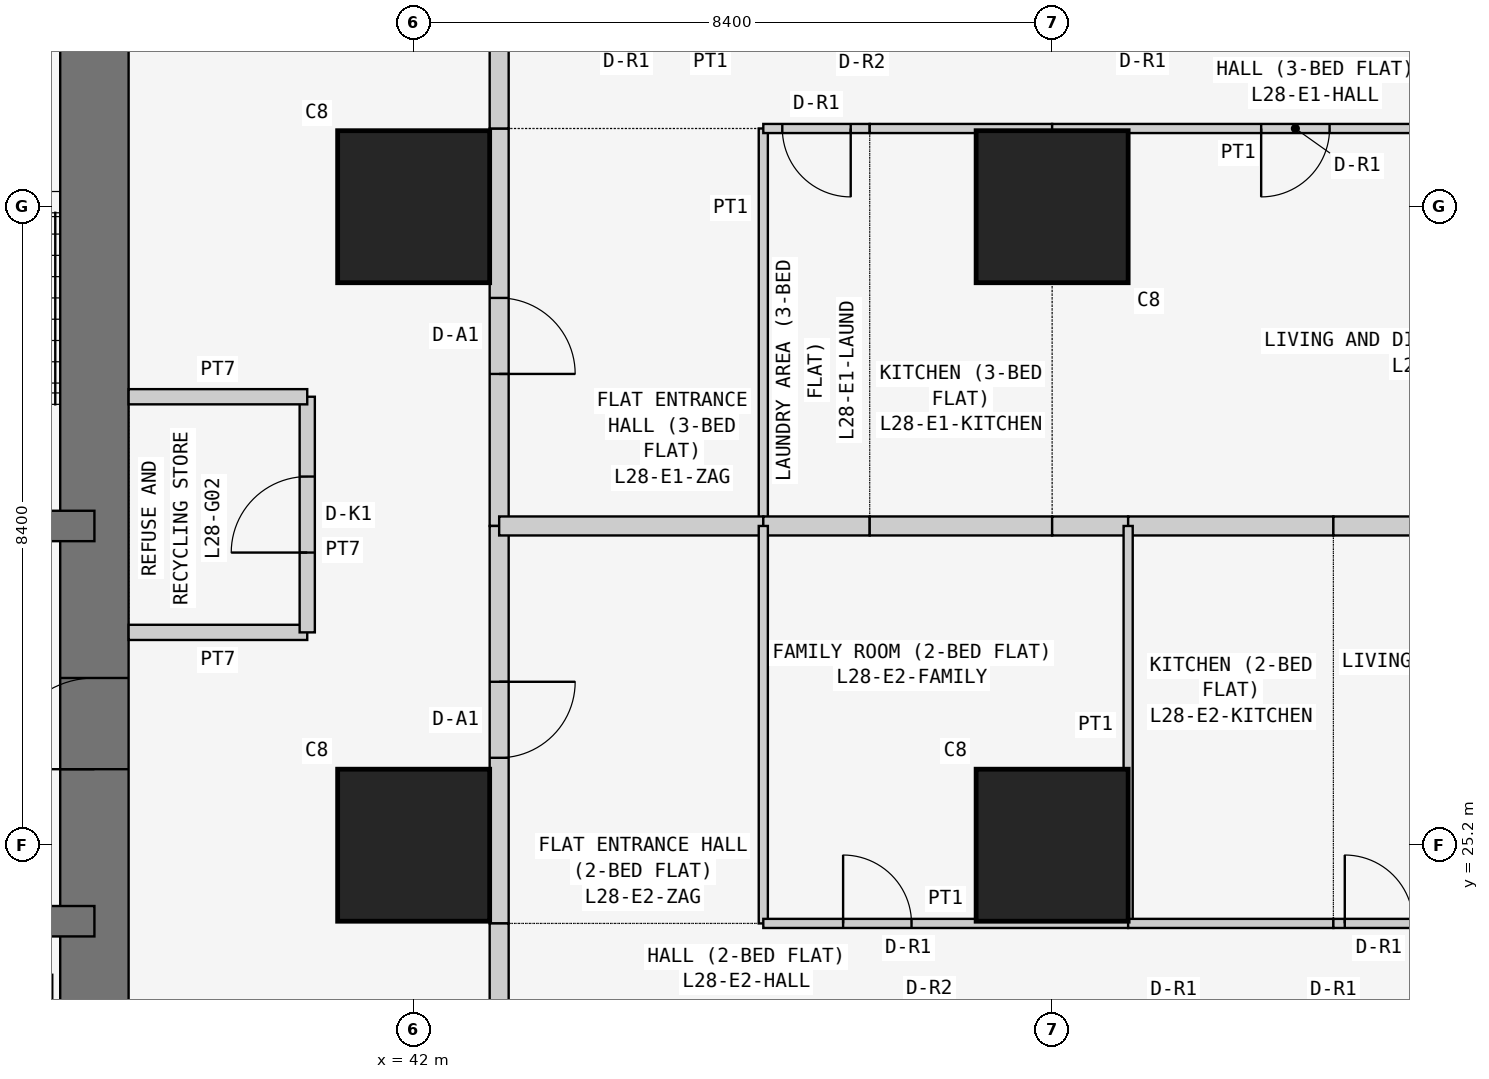
"""IFC4 building model, lengths in metres.
Left out: names, types, materials, properties, quantities, classifications, styles, units other than length and angle.
Written with IfcOpenShell. Run it as: python <this file> out.ifc"""

import sys

from ifc_helpers import new_model, si_unit, direction, frame, frame_2d, origin, origin_2d, place, context, subcontext, project, spatial, rectangle, extrude, element, fill, save


model = new_model("IFC4")
c1 = context("Model", 3, precision=1e-05, world=origin(), true_north=direction((0.0, 1.0)))
c2 = subcontext(c1, "Body", "Model", "MODEL_VIEW")
j1 = project(units=[si_unit("LENGTHUNIT", "METRE"), si_unit("PLANEANGLEUNIT", "RADIAN")], contexts=[c1])
p1 = place(None, origin())
s1 = spatial("IfcSite", under=j1, at=p1, CompositionType="ELEMENT")
p2 = place(p1, origin())
s2 = spatial("IfcBuilding", under=s1, at=p2, CompositionType="ELEMENT")
p3 = place(p2, frame((0.0, 0.0, 112.5)))
s3 = spatial("IfcBuildingStorey", under=s2, at=p3, CompositionType="ELEMENT", Elevation=112.5)
for number, where, z_axis, x_axis in (
    (1, (42.0, 25.2, 0.0), (0.0, 0.0, 1.0), (1.0, 0.0, 0.0)),
    (2, (42.0, 33.6, 0.0), (0.0, 0.0, 1.0), (1.0, 0.0, 0.0)),
    (3, (50.4, 25.2, 0.0), (0.0, 0.0, 1.0), (1.0, 0.0, 0.0)),
    (4, (50.4, 33.6, 0.0), (0.0, 0.0, 1.0), (1.0, 0.0, 0.0)),
):
    element("IfcColumn", number, at=place(p3, frame(where, z_axis=z_axis, x_axis=x_axis)), inside=s3, PredefinedType="COLUMN", context=c2, shape_type="SweptSolid", body=[
        extrude(rectangle(XDim=2.0, YDim=2.0, at=origin_2d()), origin(), (0.0, 0.0, 1.0), 3.6),
    ])
p4 = place(p3, frame((37.8, 21.0, 0.0), z_axis=(0.0, 0.0, 1.0), x_axis=(0.0, 1.0, 0.0)))
e5 = element("IfcWall", 5, at=p4, inside=s3, PredefinedType="SHEAR", context=c2, shape_type="SweptSolid", body=[
    extrude(rectangle(XDim=17.25, YDim=0.9, at=frame_2d((8.625, 0.0))), origin(), (0.0, 0.0, 1.0), 3.6),
])
p5 = place(p4, frame((5.2, 0.0, 0.0)))
e6 = element("IfcOpeningElement", 6, at=p5, cuts=e5, PredefinedType="OPENING", context=c2, shape_type="SweptSolid", body=[
    extrude(rectangle(XDim=1.2, YDim=2.1, at=frame_2d((0.6, 1.05))), frame((0.0, 0.46, 0.0), z_axis=(0.0, -1.0, 0.0), x_axis=(1.0, 0.0, 0.0)), (0.0, 0.0, 1.0), 0.92),
])
p6 = place(p3, frame((26.6, 24.2, 0.0), z_axis=(0.0, 0.0, 1.0), x_axis=(1.0, 0.0, 0.0)))
e7 = element("IfcWall", 7, at=p6, inside=s3, PredefinedType="SHEAR", context=c2, shape_type="SweptSolid", body=[
    extrude(rectangle(XDim=11.2, YDim=0.4, at=frame_2d((5.6, 0.0))), origin(), (0.0, 0.0, 1.0), 3.6),
])
p7 = place(p6, frame((0.85, 0.0, 0.0)))
e8 = element("IfcOpeningElement", 8, at=p7, cuts=e7, PredefinedType="OPENING", context=c2, shape_type="SweptSolid", body=[
    extrude(rectangle(XDim=1.1, YDim=2.1, at=frame_2d((0.55, 1.05))), frame((0.0, 0.21, 0.0), z_axis=(0.0, -1.0, 0.0), x_axis=(1.0, 0.0, 0.0)), (0.0, 0.0, 1.0), 0.42),
])
p8 = place(p6, frame((3.65, 0.0, 0.0)))
e9 = element("IfcOpeningElement", 9, at=p8, cuts=e7, PredefinedType="OPENING", context=c2, shape_type="SweptSolid", body=[
    extrude(rectangle(XDim=1.1, YDim=2.1, at=frame_2d((0.55, 1.05))), frame((0.0, 0.21, 0.0), z_axis=(0.0, -1.0, 0.0), x_axis=(1.0, 0.0, 0.0)), (0.0, 0.0, 1.0), 0.42),
])
p9 = place(p3, frame((32.2, 29.4, 0.0), z_axis=(0.0, 0.0, 1.0), x_axis=(1.0, 0.0, 0.0)))
e10 = element("IfcWall", 10, at=p9, inside=s3, PredefinedType="SHEAR", context=c2, shape_type="SweptSolid", body=[
    extrude(rectangle(XDim=5.6, YDim=0.4, at=frame_2d((2.8, 0.0))), origin(), (0.0, 0.0, 1.0), 3.6),
])
p10 = place(p9, frame((2.0, 0.0, 0.0)))
e11 = element("IfcOpeningElement", 11, at=p10, cuts=e10, PredefinedType="OPENING", context=c2, shape_type="SweptSolid", body=[
    extrude(rectangle(XDim=1.2, YDim=2.1, at=frame_2d((0.6, 1.05))), frame((0.0, 0.21, 0.0), z_axis=(0.0, -1.0, 0.0), x_axis=(1.0, 0.0, 0.0)), (0.0, 0.0, 1.0), 0.42),
])
p11 = place(p3, frame((38.25, 28.0, 0.0), z_axis=(0.0, 0.0, 1.0), x_axis=(1.0, 0.0, 0.0)))
e12 = element("IfcWall", 12, at=p11, inside=s3, PredefinedType="PARTITIONING", context=c2, shape_type="SweptSolid", body=[
    extrude(rectangle(XDim=2.35, YDim=0.2, at=frame_2d((1.175, 0.0))), origin(), (0.0, 0.0, 1.0), 3.45),
])
p12 = place(p3, frame((40.6, 28.0, 0.0), z_axis=(0.0, 0.0, 1.0), x_axis=(0.0, 1.0, 0.0)))
e13 = element("IfcWall", 13, at=p12, inside=s3, PredefinedType="PARTITIONING", context=c2, shape_type="SweptSolid", body=[
    extrude(rectangle(XDim=3.1, YDim=0.2, at=frame_2d((1.55, 0.0))), origin(), (0.0, 0.0, 1.0), 3.45),
])
p13 = place(p12, frame((1.05, 0.0, 0.0)))
e14 = element("IfcOpeningElement", 14, at=p13, cuts=e13, PredefinedType="OPENING", context=c2, shape_type="SweptSolid", body=[
    extrude(rectangle(XDim=1.0, YDim=2.1, at=frame_2d((0.5, 1.05))), frame((0.0, 0.11, 0.0), z_axis=(0.0, -1.0, 0.0), x_axis=(1.0, 0.0, 0.0)), (0.0, 0.0, 1.0), 0.22),
])
p14 = place(p3, frame((40.6, 31.1, 0.0), z_axis=(0.0, 0.0, 1.0), x_axis=(-1.0, 0.0, 0.0)))
e15 = element("IfcWall", 15, at=p14, inside=s3, PredefinedType="PARTITIONING", context=c2, shape_type="SweptSolid", body=[
    extrude(rectangle(XDim=2.35, YDim=0.2, at=frame_2d((1.175, 0.0))), origin(), (0.0, 0.0, 1.0), 3.45),
])
p15 = place(p3, frame((43.125, 34.629, 0.0), z_axis=(0.0, 0.0, 1.0), x_axis=(0.0, -1.0, 0.0)))
e16 = element("IfcWall", 16, at=p15, inside=s3, PredefinedType="PARTITIONING", context=c2, shape_type="SweptSolid", body=[
    extrude(rectangle(XDim=5.229, YDim=0.25, at=frame_2d((2.615, 0.0))), origin(), (0.0, 0.0, 1.0), 3.45),
])
p16 = place(p15, frame((2.229, 0.0, 0.0)))
e17 = element("IfcOpeningElement", 17, at=p16, cuts=e16, PredefinedType="OPENING", context=c2, shape_type="SweptSolid", body=[
    extrude(rectangle(XDim=1.0, YDim=2.1, at=frame_2d((0.5, 1.05))), frame((0.0, 0.135, 0.0), z_axis=(0.0, -1.0, 0.0), x_axis=(1.0, 0.0, 0.0)), (0.0, 0.0, 1.0), 0.27),
])
p17 = place(p3, frame((43.125, 35.829, 0.0), z_axis=(0.0, 0.0, 1.0), x_axis=(0.0, -1.0, 0.0)))
e18 = element("IfcWall", 18, at=p17, inside=s3, PredefinedType="PARTITIONING", context=c2, shape_type="SweptSolid", body=[
    extrude(rectangle(XDim=1.2, YDim=0.25, at=frame_2d((0.6, 0.0))), origin(), (0.0, 0.0, 1.0), 3.45),
])
p18 = place(p3, frame((43.125, 29.4, 0.0), z_axis=(0.0, 0.0, 1.0), x_axis=(0.0, -1.0, 0.0)))
e19 = element("IfcWall", 19, at=p18, inside=s3, PredefinedType="PARTITIONING", context=c2, shape_type="SweptSolid", body=[
    extrude(rectangle(XDim=5.229, YDim=0.25, at=frame_2d((2.615, 0.0))), origin(), (0.0, 0.0, 1.0), 3.45),
])
p19 = place(p18, frame((2.05, 0.0, 0.0)))
e20 = element("IfcOpeningElement", 20, at=p19, cuts=e19, PredefinedType="OPENING", context=c2, shape_type="SweptSolid", body=[
    extrude(rectangle(XDim=1.0, YDim=2.1, at=frame_2d((0.5, 1.05))), frame((0.0, 0.135, 0.0), z_axis=(0.0, -1.0, 0.0), x_axis=(1.0, 0.0, 0.0)), (0.0, 0.0, 1.0), 0.27),
])
p20 = place(p3, frame((43.125, 24.171, 0.0), z_axis=(0.0, 0.0, 1.0), x_axis=(0.0, -1.0, 0.0)))
e21 = element("IfcWall", 21, at=p20, inside=s3, PredefinedType="PARTITIONING", context=c2, shape_type="SweptSolid", body=[
    extrude(rectangle(XDim=1.2, YDim=0.25, at=frame_2d((0.6, 0.0))), origin(), (0.0, 0.0, 1.0), 3.45),
])
p21 = place(p3, frame((46.6, 29.4, 0.0), z_axis=(0.0, 0.0, 1.0), x_axis=(0.0, 1.0, 0.0)))
e22 = element("IfcWall", 22, at=p21, inside=s3, PredefinedType="PARTITIONING", context=c2, shape_type="SweptSolid", body=[
    extrude(rectangle(XDim=5.229, YDim=0.12, at=frame_2d((2.615, 0.0))), origin(), (0.0, 0.0, 1.0), 3.45),
])
p22 = place(p3, frame((43.125, 29.4, 0.0), z_axis=(0.0, 0.0, 1.0), x_axis=(1.0, 0.0, 0.0)))
e23 = element("IfcWall", 23, at=p22, inside=s3, PredefinedType="PARTITIONING", context=c2, shape_type="SweptSolid", body=[
    extrude(rectangle(XDim=3.475, YDim=0.25, at=frame_2d((1.738, 0.0))), origin(), (0.0, 0.0, 1.0), 3.45),
])
p23 = place(p3, frame((48.0, 34.629, 0.0), z_axis=(0.0, 0.0, 1.0), x_axis=(-1.0, 0.0, 0.0)))
e24 = element("IfcWall", 24, at=p23, inside=s3, PredefinedType="PARTITIONING", context=c2, shape_type="SweptSolid", body=[
    extrude(rectangle(XDim=1.4, YDim=0.12, at=frame_2d((0.7, 0.0))), origin(), (0.0, 0.0, 1.0), 3.45),
])
p24 = place(p23, frame((0.25, 0.0, 0.0)))
e25 = element("IfcOpeningElement", 25, at=p24, cuts=e24, PredefinedType="OPENING", context=c2, shape_type="SweptSolid", body=[
    extrude(rectangle(XDim=0.9, YDim=2.1, at=frame_2d((0.45, 1.05))), frame((0.0, 0.07, 0.0), z_axis=(0.0, -1.0, 0.0), x_axis=(1.0, 0.0, 0.0)), (0.0, 0.0, 1.0), 0.14),
])
p25 = place(p3, frame((46.6, 29.4, 0.0), z_axis=(0.0, 0.0, 1.0), x_axis=(1.0, 0.0, 0.0)))
e26 = element("IfcWall", 26, at=p25, inside=s3, PredefinedType="PARTITIONING", context=c2, shape_type="SweptSolid", body=[
    extrude(rectangle(XDim=1.4, YDim=0.25, at=frame_2d((0.7, 0.0))), origin(), (0.0, 0.0, 1.0), 3.45),
])
p26 = place(p3, frame((50.4, 34.629, 0.0), z_axis=(0.0, 0.0, 1.0), x_axis=(-1.0, 0.0, 0.0)))
e27 = element("IfcWall", 27, at=p26, inside=s3, PredefinedType="PARTITIONING", context=c2, shape_type="SweptSolid", body=[
    extrude(rectangle(XDim=2.4, YDim=0.12, at=frame_2d((1.2, 0.0))), origin(), (0.0, 0.0, 1.0), 3.45),
])
p27 = place(p3, frame((48.0, 29.4, 0.0), z_axis=(0.0, 0.0, 1.0), x_axis=(1.0, 0.0, 0.0)))
e28 = element("IfcWall", 28, at=p27, inside=s3, PredefinedType="PARTITIONING", context=c2, shape_type="SweptSolid", body=[
    extrude(rectangle(XDim=2.4, YDim=0.25, at=frame_2d((1.2, 0.0))), origin(), (0.0, 0.0, 1.0), 3.45),
])
p28 = place(p3, frame((55.3, 34.629, 0.0), z_axis=(0.0, 0.0, 1.0), x_axis=(-1.0, 0.0, 0.0)))
e29 = element("IfcWall", 29, at=p28, inside=s3, PredefinedType="PARTITIONING", context=c2, shape_type="SweptSolid", body=[
    extrude(rectangle(XDim=4.9, YDim=0.12, at=frame_2d((2.45, 0.0))), origin(), (0.0, 0.0, 1.0), 3.45),
])
p29 = place(p28, frame((1.25, 0.0, 0.0)))
e30 = element("IfcOpeningElement", 30, at=p29, cuts=e29, PredefinedType="OPENING", context=c2, shape_type="SweptSolid", body=[
    extrude(rectangle(XDim=0.9, YDim=2.1, at=frame_2d((0.45, 1.05))), frame((0.0, 0.07, 0.0), z_axis=(0.0, -1.0, 0.0), x_axis=(1.0, 0.0, 0.0)), (0.0, 0.0, 1.0), 0.14),
])
p30 = place(p3, frame((50.4, 29.4, 0.0), z_axis=(0.0, 0.0, 1.0), x_axis=(1.0, 0.0, 0.0)))
e31 = element("IfcWall", 31, at=p30, inside=s3, PredefinedType="PARTITIONING", context=c2, shape_type="SweptSolid", body=[
    extrude(rectangle(XDim=1.0, YDim=0.25, at=frame_2d((0.5, 0.0))), origin(), (0.0, 0.0, 1.0), 3.45),
])
p31 = place(p3, frame((51.4, 29.4, 0.0), z_axis=(0.0, 0.0, 1.0), x_axis=(1.0, 0.0, 0.0)))
e32 = element("IfcWall", 32, at=p31, inside=s3, PredefinedType="PARTITIONING", context=c2, shape_type="SweptSolid", body=[
    extrude(rectangle(XDim=2.7, YDim=0.25, at=frame_2d((1.35, 0.0))), origin(), (0.0, 0.0, 1.0), 3.45),
])
p32 = place(p3, frame((54.1, 29.4, 0.0), z_axis=(0.0, 0.0, 1.0), x_axis=(1.0, 0.0, 0.0)))
e33 = element("IfcWall", 33, at=p32, inside=s3, PredefinedType="PARTITIONING", context=c2, shape_type="SweptSolid", body=[
    extrude(rectangle(XDim=5.35, YDim=0.25, at=frame_2d((2.675, 0.0))), origin(), (0.0, 0.0, 1.0), 3.45),
])
for number, where, z_axis, x_axis in (
    (34, (46.6, 29.4, 0.0), (0.0, 0.0, 1.0), (0.0, -1.0, 0.0)),
    (35, (51.4, 29.4, 0.0), (0.0, 0.0, 1.0), (0.0, -1.0, 0.0)),
):
    element("IfcWall", number, at=place(p3, frame(where, z_axis=z_axis, x_axis=x_axis)), inside=s3, PredefinedType="PARTITIONING", context=c2, shape_type="SweptSolid", body=[
        extrude(rectangle(XDim=5.229, YDim=0.12, at=frame_2d((2.615, 0.0))), origin(), (0.0, 0.0, 1.0), 3.45),
    ])
p33 = place(p3, frame((51.4, 24.171, 0.0), z_axis=(0.0, 0.0, 1.0), x_axis=(-1.0, 0.0, 0.0)))
e36 = element("IfcWall", 36, at=p33, inside=s3, PredefinedType="PARTITIONING", context=c2, shape_type="SweptSolid", body=[
    extrude(rectangle(XDim=4.8, YDim=0.12, at=frame_2d((2.4, 0.0))), origin(), (0.0, 0.0, 1.0), 3.45),
])
p34 = place(p33, frame((2.85, 0.0, 0.0)))
e37 = element("IfcOpeningElement", 37, at=p34, cuts=e36, PredefinedType="OPENING", context=c2, shape_type="SweptSolid", body=[
    extrude(rectangle(XDim=0.9, YDim=2.1, at=frame_2d((0.45, 1.05))), frame((0.0, 0.07, 0.0), z_axis=(0.0, -1.0, 0.0), x_axis=(1.0, 0.0, 0.0)), (0.0, 0.0, 1.0), 0.14),
])
p35 = place(p3, frame((54.1, 24.171, 0.0), z_axis=(0.0, 0.0, 1.0), x_axis=(-1.0, 0.0, 0.0)))
e38 = element("IfcWall", 38, at=p35, inside=s3, PredefinedType="PARTITIONING", context=c2, shape_type="SweptSolid", body=[
    extrude(rectangle(XDim=2.7, YDim=0.12, at=frame_2d((1.35, 0.0))), origin(), (0.0, 0.0, 1.0), 3.45),
])
p36 = place(p3, frame((55.3, 24.171, 0.0), z_axis=(0.0, 0.0, 1.0), x_axis=(-1.0, 0.0, 0.0)))
e39 = element("IfcWall", 39, at=p36, inside=s3, PredefinedType="PARTITIONING", context=c2, shape_type="SweptSolid", body=[
    extrude(rectangle(XDim=1.2, YDim=0.12, at=frame_2d((0.6, 0.0))), origin(), (0.0, 0.0, 1.0), 3.45),
])
p37 = place(p36, frame((0.15, 0.0, 0.0)))
e40 = element("IfcOpeningElement", 40, at=p37, cuts=e39, PredefinedType="OPENING", context=c2, shape_type="SweptSolid", body=[
    extrude(rectangle(XDim=0.9, YDim=2.1, at=frame_2d((0.45, 1.05))), frame((0.0, 0.07, 0.0), z_axis=(0.0, -1.0, 0.0), x_axis=(1.0, 0.0, 0.0)), (0.0, 0.0, 1.0), 0.14),
])
p38 = place(p13, origin())
e41 = element("IfcDoor", 41, at=p38, inside=s3, OperationType="SINGLE_SWING_LEFT", PredefinedType="DOOR", context=c2, shape_type="SweptSolid", body=[
    extrude(rectangle(XDim=1.0, YDim=2.1, at=frame_2d((0.5, 1.05))), frame((0.0, 0.025, 0.0), z_axis=(0.0, -1.0, 0.0), x_axis=(1.0, 0.0, 0.0)), (0.0, 0.0, 1.0), 0.05),
])
fill(e14, e41)
p39 = place(p16, origin())
e42 = element("IfcDoor", 42, at=p39, inside=s3, OperationType="SINGLE_SWING_RIGHT", PredefinedType="DOOR", context=c2, shape_type="SweptSolid", body=[
    extrude(rectangle(XDim=1.0, YDim=2.1, at=frame_2d((0.5, 1.05))), frame((0.0, 0.025, 0.0), z_axis=(0.0, -1.0, 0.0), x_axis=(1.0, 0.0, 0.0)), (0.0, 0.0, 1.0), 0.05),
])
fill(e17, e42)
p40 = place(p24, origin())
e43 = element("IfcDoor", 43, at=p40, inside=s3, OperationType="SINGLE_SWING_LEFT", PredefinedType="DOOR", context=c2, shape_type="SweptSolid", body=[
    extrude(rectangle(XDim=0.9, YDim=2.1, at=frame_2d((0.45, 1.05))), frame((0.0, 0.025, 0.0), z_axis=(0.0, -1.0, 0.0), x_axis=(1.0, 0.0, 0.0)), (0.0, 0.0, 1.0), 0.05),
])
fill(e25, e43)
p41 = place(p29, origin())
e44 = element("IfcDoor", 44, at=p41, inside=s3, OperationType="SINGLE_SWING_RIGHT", PredefinedType="DOOR", context=c2, shape_type="SweptSolid", body=[
    extrude(rectangle(XDim=0.9, YDim=2.1, at=frame_2d((0.45, 1.05))), frame((0.0, 0.025, 0.0), z_axis=(0.0, -1.0, 0.0), x_axis=(1.0, 0.0, 0.0)), (0.0, 0.0, 1.0), 0.05),
])
fill(e30, e44)
p42 = place(p19, origin())
e45 = element("IfcDoor", 45, at=p42, inside=s3, OperationType="SINGLE_SWING_LEFT", PredefinedType="DOOR", context=c2, shape_type="SweptSolid", body=[
    extrude(rectangle(XDim=1.0, YDim=2.1, at=frame_2d((0.5, 1.05))), frame((0.0, 0.025, 0.0), z_axis=(0.0, -1.0, 0.0), x_axis=(1.0, 0.0, 0.0)), (0.0, 0.0, 1.0), 0.05),
])
fill(e20, e45)
p43 = place(p34, frame((0.9, 0.0, 0.0), z_axis=(0.0, 0.0, 1.0), x_axis=(-1.0, 0.0, 0.0)))
e46 = element("IfcDoor", 46, at=p43, inside=s3, OperationType="SINGLE_SWING_LEFT", PredefinedType="DOOR", context=c2, shape_type="SweptSolid", body=[
    extrude(rectangle(XDim=0.9, YDim=2.1, at=frame_2d((0.45, 1.05))), frame((0.0, 0.025, 0.0), z_axis=(0.0, -1.0, 0.0), x_axis=(1.0, 0.0, 0.0)), (0.0, 0.0, 1.0), 0.05),
])
fill(e37, e46)
p44 = place(p37, frame((0.9, 0.0, 0.0), z_axis=(0.0, 0.0, 1.0), x_axis=(-1.0, 0.0, 0.0)))
e47 = element("IfcDoor", 47, at=p44, inside=s3, OperationType="SINGLE_SWING_LEFT", PredefinedType="DOOR", context=c2, shape_type="SweptSolid", body=[
    extrude(rectangle(XDim=0.9, YDim=2.1, at=frame_2d((0.45, 1.05))), frame((0.0, 0.025, 0.0), z_axis=(0.0, -1.0, 0.0), x_axis=(1.0, 0.0, 0.0)), (0.0, 0.0, 1.0), 0.05),
])
fill(e40, e47)
p45 = place(p5, origin())
e48 = element("IfcDoor", 48, at=p45, inside=s3, OperationType="SINGLE_SWING_LEFT", PredefinedType="DOOR", context=c2, shape_type="SweptSolid", body=[
    extrude(rectangle(XDim=1.2, YDim=2.1, at=frame_2d((0.6, 1.05))), frame((0.0, 0.025, 0.0), z_axis=(0.0, -1.0, 0.0), x_axis=(1.0, 0.0, 0.0)), (0.0, 0.0, 1.0), 0.05),
])
fill(e6, e48)
save(model, sys.argv[1])
